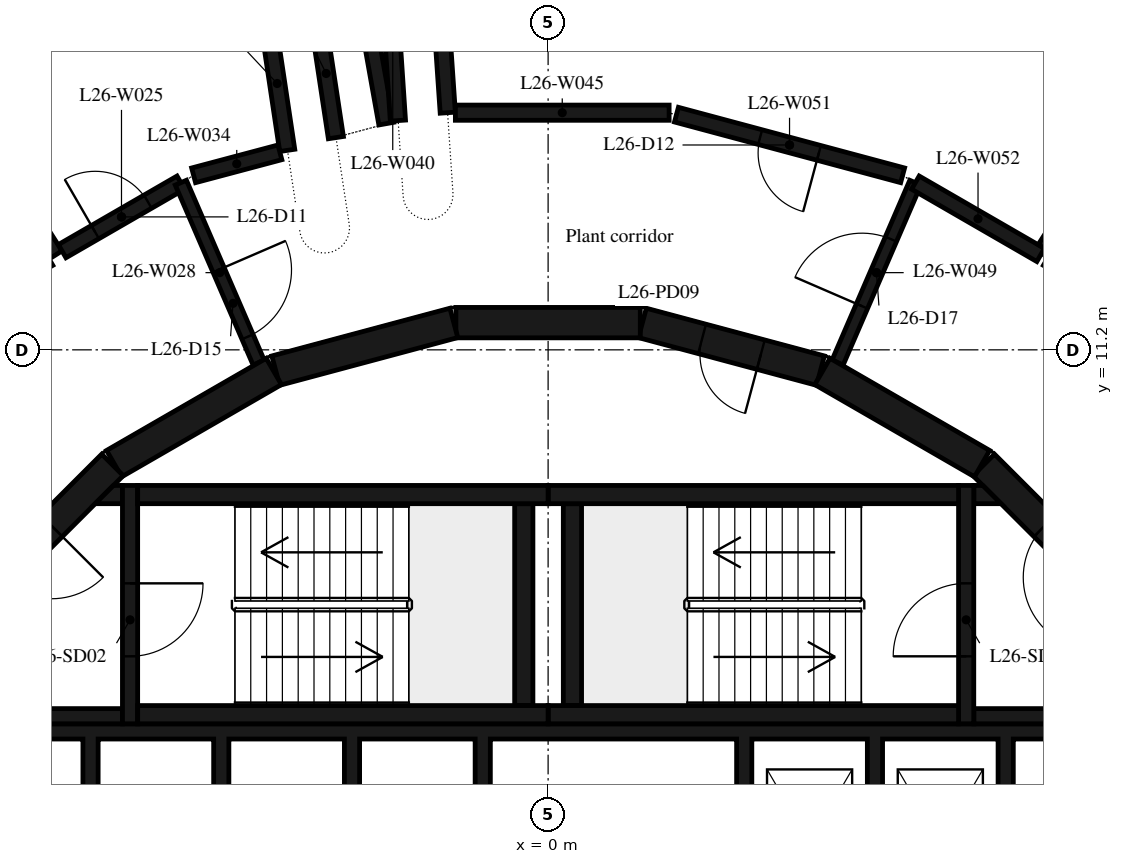
"""IFC4 building model, lengths in metres.
Left out: names, types, materials, properties, quantities, classifications, styles, units other than length and angle.
Written with IfcOpenShell. Run it as: python <this file> out.ifc"""

import sys

from ifc_helpers import new_model, si_unit, direction, frame, frame_2d, origin, place, context, subcontext, project, spatial, polyline, rectangle, outline, extrude, element, fill, save


model = new_model("IFC4")
c1 = context("Model", 3, precision=1e-05, world=origin(), true_north=direction((0.0, 1.0)))
c2 = subcontext(c1, "Body", "Model", "MODEL_VIEW")
j1 = project(units=[si_unit("LENGTHUNIT", "METRE"), si_unit("PLANEANGLEUNIT", "RADIAN")], contexts=[c1])
p1 = place(None, origin())
s1 = spatial("IfcSite", under=j1, at=p1, CompositionType="ELEMENT")
p2 = place(p1, origin())
s2 = spatial("IfcBuilding", under=s1, at=p2, CompositionType="ELEMENT")
p3 = place(p2, frame((0.0, 0.0, 108.2)))
s3 = spatial("IfcBuildingStorey", under=s2, at=p3, CompositionType="ELEMENT", Elevation=108.2)
p4 = place(p3, frame((9.308, 7.164, 0.0), z_axis=(0.0, 0.0, 1.0), x_axis=(-0.707106781187, 0.707106781187, 0.0)))
e1 = element("IfcWall", 1, at=p4, inside=s3, PredefinedType="SHEAR", context=c2, shape_type="SweptSolid", body=[
    extrude(rectangle(XDim=3.032, YDim=0.5, at=frame_2d((1.516, 0.0))), origin(), (0.0, 0.0, 1.0), 4.75),
])
p5 = place(p4, frame((0.416, 0.0, 0.0)))
e2 = element("IfcOpeningElement", 2, at=p5, cuts=e1, PredefinedType="OPENING", context=c2, shape_type="SweptSolid", body=[
    extrude(rectangle(XDim=1.2, YDim=2.1, at=frame_2d((0.6, 1.05))), frame((0.0, 0.26, 0.0), z_axis=(0.0, -1.0, 0.0), x_axis=(1.0, 0.0, 0.0)), (0.0, 0.0, 1.0), 0.52),
])
p6 = place(p3, frame((7.137, 9.329, 0.0), z_axis=(0.0, 0.0, 1.0), x_axis=(-0.865975092491, 0.500087131594, 0.0)))
e3 = element("IfcWall", 3, at=p6, inside=s3, PredefinedType="SHEAR", context=c2, shape_type="SweptSolid", body=[
    extrude(rectangle(XDim=3.033, YDim=0.5, at=frame_2d((1.516, 0.0))), origin(), (0.0, 0.0, 1.0), 4.75),
])
p7 = place(p3, frame((4.479, 10.858, 0.0), z_axis=(0.0, 0.0, 1.0), x_axis=(-0.965948410781, 0.258734743916, 0.0)))
e4 = element("IfcWall", 4, at=p7, inside=s3, PredefinedType="SHEAR", context=c2, shape_type="SweptSolid", body=[
    extrude(rectangle(XDim=3.033, YDim=0.5, at=frame_2d((1.516, 0.0))), origin(), (0.0, 0.0, 1.0), 4.75),
])
p8 = place(p7, frame((1.016, 0.0, 0.0)))
e5 = element("IfcOpeningElement", 5, at=p8, cuts=e4, PredefinedType="OPENING", context=c2, shape_type="SweptSolid", body=[
    extrude(rectangle(XDim=1.0, YDim=2.4, at=frame_2d((0.5, 1.2))), frame((0.0, 0.26, 0.0), z_axis=(0.0, -1.0, 0.0), x_axis=(1.0, 0.0, 0.0)), (0.0, 0.0, 1.0), 0.52),
])
for number, where, z_axis, x_axis in (
    (6, (1.516, 11.647, 0.0), (0.0, 0.0, 1.0), (-1.0, 0.0, 0.0)),
    (7, (-1.55, 11.643, 0.0), (0.0, 0.0, 1.0), (-0.966, -0.259, 0.0)),
    (8, (-4.51, 10.845, 0.0), (0.0, 0.0, 1.0), (-0.866, -0.5, 0.0)),
):
    element("IfcWall", number, at=place(p3, frame(where, z_axis=z_axis, x_axis=x_axis)), inside=s3, PredefinedType="SHEAR", context=c2, shape_type="SweptSolid", body=[
        extrude(rectangle(XDim=3.033, YDim=0.5, at=frame_2d((1.516, 0.0))), origin(), (0.0, 0.0, 1.0), 4.75),
    ])
p9 = place(p3, frame((-7.164, 9.308, 0.0), z_axis=(0.0, 0.0, 1.0), x_axis=(-0.707106781187, -0.707106781187, 0.0)))
e9 = element("IfcWall", 9, at=p9, inside=s3, PredefinedType="SHEAR", context=c2, shape_type="SweptSolid", body=[
    extrude(rectangle(XDim=3.032, YDim=0.5, at=frame_2d((1.516, 0.0))), origin(), (0.0, 0.0, 1.0), 4.75),
])
p10 = place(p9, frame((1.416, 0.0, 0.0)))
e10 = element("IfcOpeningElement", 10, at=p10, cuts=e9, PredefinedType="OPENING", context=c2, shape_type="SweptSolid", body=[
    extrude(rectangle(XDim=1.2, YDim=2.1, at=frame_2d((0.6, 1.05))), frame((0.0, 0.26, 0.0), z_axis=(0.0, -1.0, 0.0), x_axis=(1.0, 0.0, 0.0)), (0.0, 0.0, 1.0), 0.52),
])
for number, where, z_axis, x_axis in (
    (11, (0.0, 5.2, 0.0), (0.0, 0.0, 1.0), (1.0, 0.0, 0.0)),
    (12, (0.0, 8.82, 0.0), (0.0, 0.0, 1.0), (1.0, 0.0, 0.0)),
):
    element("IfcWall", number, at=place(p3, frame(where, z_axis=z_axis, x_axis=x_axis)), inside=s3, PredefinedType="SHEAR", context=c2, shape_type="SweptSolid", body=[
        extrude(rectangle(XDim=6.75, YDim=0.3, at=frame_2d((3.375, 0.0))), origin(), (0.0, 0.0, 1.0), 4.75),
    ])
p11 = place(p3, frame((0.4, 5.35, 0.0), z_axis=(0.0, 0.0, 1.0), x_axis=(0.0, 1.0, 0.0)))
e13 = element("IfcWall", 13, at=p11, inside=s3, PredefinedType="SHEAR", context=c2, shape_type="SweptSolid", body=[
    extrude(rectangle(XDim=3.32, YDim=0.3, at=frame_2d((1.66, 0.0))), origin(), (0.0, 0.0, 1.0), 4.75),
])
p12 = place(p3, frame((6.875, 5.05, 0.0), z_axis=(0.0, 0.0, 1.0), x_axis=(0.0, 1.0, 0.0)))
e14 = element("IfcWall", 14, at=p12, inside=s3, PredefinedType="SHEAR", context=c2, shape_type="SweptSolid", body=[
    extrude(rectangle(XDim=3.92, YDim=0.25, at=frame_2d((1.96, 0.0))), origin(), (0.0, 0.0, 1.0), 4.75),
])
p13 = place(p12, frame((1.11, 0.0, 0.0)))
e15 = element("IfcOpeningElement", 15, at=p13, cuts=e14, PredefinedType="OPENING", context=c2, shape_type="SweptSolid", body=[
    extrude(rectangle(XDim=1.2, YDim=2.1, at=frame_2d((0.6, 1.05))), frame((0.0, 0.135, 0.0), z_axis=(0.0, -1.0, 0.0), x_axis=(1.0, 0.0, 0.0)), (0.0, 0.0, 1.0), 0.27),
])
p14 = place(p3, frame((7.0, 5.175, 0.0), z_axis=(0.0, 0.0, 1.0), x_axis=(1.0, 0.0, 0.0)))
e16 = element("IfcWall", 16, at=p14, inside=s3, PredefinedType="SHEAR", context=c2, shape_type="SweptSolid", body=[
    extrude(rectangle(XDim=3.1, YDim=0.25, at=frame_2d((1.55, 0.0))), origin(), (0.0, 0.0, 1.0), 4.75),
])
p15 = place(p3, origin())
e17 = element("IfcWall", 17, at=p15, inside=s3, PredefinedType="SHEAR", context=c2, shape_type="SweptSolid", body=[
    extrude(outline(polyline([(7.448, 8.67), (7.0, 8.67), (7.0, 8.97), (7.148, 8.97), (7.448, 8.67)])), origin(), (0.0, 0.0, 1.0), 4.75),
])
for number, where, z_axis, x_axis in (
    (18, (-6.75, 5.2, 0.0), (0.0, 0.0, 1.0), (1.0, 0.0, 0.0)),
    (19, (-6.75, 8.82, 0.0), (0.0, 0.0, 1.0), (1.0, 0.0, 0.0)),
):
    element("IfcWall", number, at=place(p3, frame(where, z_axis=z_axis, x_axis=x_axis)), inside=s3, PredefinedType="SHEAR", context=c2, shape_type="SweptSolid", body=[
        extrude(rectangle(XDim=6.75, YDim=0.3, at=frame_2d((3.375, 0.0))), origin(), (0.0, 0.0, 1.0), 4.75),
    ])
p16 = place(p3, frame((-0.4, 5.35, 0.0), z_axis=(0.0, 0.0, 1.0), x_axis=(0.0, 1.0, 0.0)))
e20 = element("IfcWall", 20, at=p16, inside=s3, PredefinedType="SHEAR", context=c2, shape_type="SweptSolid", body=[
    extrude(rectangle(XDim=3.32, YDim=0.3, at=frame_2d((1.66, 0.0))), origin(), (0.0, 0.0, 1.0), 4.75),
])
p17 = place(p3, frame((-6.875, 8.97, 0.0), z_axis=(0.0, 0.0, 1.0), x_axis=(0.0, -1.0, 0.0)))
e21 = element("IfcWall", 21, at=p17, inside=s3, PredefinedType="SHEAR", context=c2, shape_type="SweptSolid", body=[
    extrude(rectangle(XDim=3.92, YDim=0.25, at=frame_2d((1.96, 0.0))), origin(), (0.0, 0.0, 1.0), 4.75),
])
p18 = place(p17, frame((1.61, 0.0, 0.0)))
e22 = element("IfcOpeningElement", 22, at=p18, cuts=e21, PredefinedType="OPENING", context=c2, shape_type="SweptSolid", body=[
    extrude(rectangle(XDim=1.2, YDim=2.1, at=frame_2d((0.6, 1.05))), frame((0.0, 0.135, 0.0), z_axis=(0.0, -1.0, 0.0), x_axis=(1.0, 0.0, 0.0)), (0.0, 0.0, 1.0), 0.27),
])
p19 = place(p3, frame((-7.0, 5.175, 0.0), z_axis=(0.0, 0.0, 1.0), x_axis=(-1.0, 0.0, 0.0)))
e23 = element("IfcWall", 23, at=p19, inside=s3, PredefinedType="SHEAR", context=c2, shape_type="SweptSolid", body=[
    extrude(rectangle(XDim=3.1, YDim=0.25, at=frame_2d((1.55, 0.0))), origin(), (0.0, 0.0, 1.0), 4.75),
])
p20 = place(p3, origin())
e24 = element("IfcWall", 24, at=p20, inside=s3, PredefinedType="SHEAR", context=c2, shape_type="SweptSolid", body=[
    extrude(outline(polyline([(-7.148, 8.97), (-7.0, 8.97), (-7.0, 8.67), (-7.448, 8.67), (-7.148, 8.97)])), origin(), (0.0, 0.0, 1.0), 4.75),
])
p21 = place(p3, origin())
e25 = element("IfcWall", 25, at=p21, inside=s3, PredefinedType="SHEAR", context=c2, shape_type="SweptSolid", body=[
    extrude(outline(polyline([(-9.55, 4.8), (-7.65, 4.8), (-7.65, 1.9), (-7.4, 1.9), (-7.4, 4.8), (-5.5, 4.8), (-5.5, 1.9), (-5.25, 1.9), (-5.25, 4.8), (-3.35, 4.8), (-3.35, 1.9), (-3.1, 1.9), (-3.1, 4.8), (-1.2, 4.8), (-1.2, 1.9), (-0.95, 1.9), (-0.95, 4.8), (3.1, 4.8), (3.1, 1.9), (3.35, 1.9), (3.35, 4.8), (5.25, 4.8), (5.25, 1.9), (5.5, 1.9), (5.5, 4.8), (7.4, 4.8), (7.4, 1.9), (7.65, 1.9), (7.65, 4.8), (9.55, 4.8), (9.55, 1.9), (9.8, 1.9), (9.8, 4.8), (9.8, 5.05), (-9.8, 5.05), (-9.8, 4.8), (-9.8, 1.9), (-9.55, 1.9), (-9.55, 4.8)])), origin(), (0.0, 0.0, 1.0), 4.75),
])
p22 = place(p3, frame((-8.1, 12.76, 0.0), z_axis=(0.0, 0.0, 1.0), x_axis=(-0.535839810612, 0.844319665389, 0.0)))
e26 = element("IfcWall", 26, at=p22, inside=s3, PredefinedType="PARTITIONING", context=c2, shape_type="SweptSolid", body=[
    extrude(rectangle(XDim=8.057, YDim=0.25, at=frame_2d((4.028, 0.0))), origin(), (0.0, 0.0, 1.0), 4.75),
])
p23 = place(p3, frame((-8.208, 12.697, 0.0), z_axis=(0.0, 0.0, 1.0), x_axis=(-0.86455637663, -0.502535841138, 0.0)))
e27 = element("IfcWall", 27, at=p23, inside=s3, PredefinedType="PARTITIONING", context=c2, shape_type="SweptSolid", body=[
    extrude(rectangle(XDim=1.103, YDim=0.25, at=frame_2d((0.552, 0.0))), origin(), (0.0, 0.0, 1.0), 4.75),
])
p24 = place(p3, frame((-7.992, 12.823, 0.0), z_axis=(0.0, 0.0, 1.0), x_axis=(0.865900522319, 0.500216238688, 0.0)))
e28 = element("IfcWall", 28, at=p24, inside=s3, PredefinedType="PARTITIONING", context=c2, shape_type="SweptSolid", body=[
    extrude(rectangle(XDim=2.254, YDim=0.25, at=frame_2d((1.127, 0.0))), origin(), (0.0, 0.0, 1.0), 4.75),
])
p25 = place(p24, frame((0.627, 0.0, 0.0)))
e29 = element("IfcOpeningElement", 29, at=p25, cuts=e28, PredefinedType="OPENING", context=c2, shape_type="SweptSolid", body=[
    extrude(rectangle(XDim=1.0, YDim=2.1, at=frame_2d((0.5, 1.05))), frame((0.0, 0.135, 0.0), z_axis=(0.0, -1.0, 0.0), x_axis=(1.0, 0.0, 0.0)), (0.0, 0.0, 1.0), 0.27),
])
p26 = place(p3, frame((-6.04, 13.949, 0.0), z_axis=(0.0, 0.0, 1.0), x_axis=(0.396905977672, -0.917859272922, 0.0)))
e30 = element("IfcWall", 30, at=p26, inside=s3, PredefinedType="PARTITIONING", context=c2, shape_type="SweptSolid", body=[
    extrude(rectangle(XDim=3.224, YDim=0.2, at=frame_2d((1.612, 0.0))), origin(), (0.0, 0.0, 1.0), 4.75),
])
p27 = place(p26, frame((1.562, 0.0, 0.0)))
e31 = element("IfcOpeningElement", 31, at=p27, cuts=e30, PredefinedType="OPENING", context=c2, shape_type="SweptSolid", body=[
    extrude(rectangle(XDim=1.2, YDim=2.1, at=frame_2d((0.6, 1.05))), frame((0.0, 0.11, 0.0), z_axis=(0.0, -1.0, 0.0), x_axis=(1.0, 0.0, 0.0)), (0.0, 0.0, 1.0), 0.22),
])
p28 = place(p3, frame((-4.62, 16.68, 0.0), z_axis=(0.0, 0.0, 1.0), x_axis=(0.148378019052, -0.98893071722, 0.0)))
e32 = element("IfcWall", 32, at=p28, inside=s3, PredefinedType="PARTITIONING", context=c2, shape_type="SweptSolid", body=[
    extrude(rectangle(XDim=2.225, YDim=0.25, at=frame_2d((1.112, 0.0))), origin(), (0.0, 0.0, 1.0), 4.75),
])
p29 = place(p3, frame((-4.411, 14.448, 0.0), z_axis=(0.0, 0.0, 1.0), x_axis=(-0.966364499744, -0.257176308464, 0.0)))
e33 = element("IfcWall", 33, at=p29, inside=s3, PredefinedType="PARTITIONING", context=c2, shape_type="SweptSolid", body=[
    extrude(rectangle(XDim=1.469, YDim=0.25, at=frame_2d((0.734, 0.0))), origin(), (0.0, 0.0, 1.0), 4.75),
])
p30 = place(p3, frame((-3.49, 14.69, 0.0), z_axis=(0.0, 0.0, 1.0), x_axis=(-0.149968031865, 0.98869084623, 0.0)))
e34 = element("IfcWall", 34, at=p30, inside=s3, PredefinedType="PARTITIONING", context=c2, shape_type="SweptSolid", body=[
    extrude(rectangle(XDim=2.134, YDim=0.25, at=frame_2d((1.067, 0.0))), origin(), (0.0, 0.0, 1.0), 4.75),
])
p31 = place(p3, frame((-2.66, 14.92, 0.0), z_axis=(0.0, 0.0, 1.0), x_axis=(-0.175922099098, 0.984404091341, 0.0)))
e35 = element("IfcWall", 35, at=p31, inside=s3, PredefinedType="PARTITIONING", context=c2, shape_type="SweptSolid", body=[
    extrude(rectangle(XDim=6.106, YDim=0.25, at=frame_2d((3.053, 0.0))), origin(), (0.0, 0.0, 1.0), 4.75),
])
p32 = place(p3, frame((-2.64, 17.52, 0.0), z_axis=(0.0, 0.0, 1.0), x_axis=(0.066487308806, -0.997787270799, 0.0)))
e36 = element("IfcWall", 36, at=p32, inside=s3, PredefinedType="PARTITIONING", context=c2, shape_type="SweptSolid", body=[
    extrude(rectangle(XDim=2.556, YDim=0.25, at=frame_2d((1.278, 0.0))), origin(), (0.0, 0.0, 1.0), 4.75),
])
p33 = place(p3, frame((-1.65, 15.1, 0.0), z_axis=(0.0, 0.0, 1.0), x_axis=(-0.06845491093, 0.997654211222, 0.0)))
e37 = element("IfcWall", 37, at=p33, inside=s3, PredefinedType="PARTITIONING", context=c2, shape_type="SweptSolid", body=[
    extrude(rectangle(XDim=2.486, YDim=0.25, at=frame_2d((1.243, 0.0))), origin(), (0.0, 0.0, 1.0), 4.75),
])
p34 = place(p3, frame((1.99, 15.1, 0.0), z_axis=(0.0, 0.0, 1.0), x_axis=(-1.0, 0.0, 0.0)))
e38 = element("IfcWall", 38, at=p34, inside=s3, PredefinedType="PARTITIONING", context=c2, shape_type="SweptSolid", body=[
    extrude(rectangle(XDim=3.515, YDim=0.25, at=frame_2d((1.757, 0.0))), origin(), (0.0, 0.0, 1.0), 4.75),
])
p35 = place(p3, frame((4.76, 10.99, 0.0), z_axis=(0.0, 0.0, 1.0), x_axis=(0.396905977672, 0.917859272922, 0.0)))
e39 = element("IfcWall", 39, at=p35, inside=s3, PredefinedType="PARTITIONING", context=c2, shape_type="SweptSolid", body=[
    extrude(rectangle(XDim=3.224, YDim=0.2, at=frame_2d((1.612, 0.0))), origin(), (0.0, 0.0, 1.0), 4.75),
])
p36 = place(p35, frame((1.012, 0.0, 0.0)))
e40 = element("IfcOpeningElement", 40, at=p36, cuts=e39, PredefinedType="OPENING", context=c2, shape_type="SweptSolid", body=[
    extrude(rectangle(XDim=1.2, YDim=2.1, at=frame_2d((0.6, 1.05))), frame((0.0, 0.11, 0.0), z_axis=(0.0, -1.0, 0.0), x_axis=(1.0, 0.0, 0.0)), (0.0, 0.0, 1.0), 0.22),
])
p37 = place(p3, frame((5.83, 14.07, 0.0), z_axis=(0.0, 0.0, 1.0), x_axis=(-0.965861411942, 0.259059323171, 0.0)))
e41 = element("IfcWall", 41, at=p37, inside=s3, PredefinedType="PARTITIONING", context=c2, shape_type="SweptSolid", body=[
    extrude(rectangle(XDim=3.851, YDim=0.25, at=frame_2d((1.925, 0.0))), origin(), (0.0, 0.0, 1.0), 4.75),
])
p38 = place(p37, frame((1.425, 0.0, 0.0)))
e42 = element("IfcOpeningElement", 42, at=p38, cuts=e41, PredefinedType="OPENING", context=c2, shape_type="SweptSolid", body=[
    extrude(rectangle(XDim=1.0, YDim=2.1, at=frame_2d((0.5, 1.05))), frame((0.0, 0.135, 0.0), z_axis=(0.0, -1.0, 0.0), x_axis=(1.0, 0.0, 0.0)), (0.0, 0.0, 1.0), 0.27),
])
p39 = place(p3, frame((6.04, 13.95, 0.0), z_axis=(0.0, 0.0, 1.0), x_axis=(0.865922362496, -0.500178430292, 0.0)))
e43 = element("IfcWall", 43, at=p39, inside=s3, PredefinedType="PARTITIONING", context=c2, shape_type="SweptSolid", body=[
    extrude(rectangle(XDim=2.379, YDim=0.25, at=frame_2d((1.189, 0.0))), origin(), (0.0, 0.0, 1.0), 4.75),
])
p40 = place(p3, frame((8.167, 12.865, 0.0), z_axis=(0.0, 0.0, 1.0), x_axis=(0.535313877542, 0.84465321435, 0.0)))
e44 = element("IfcWall", 44, at=p40, inside=s3, PredefinedType="PARTITIONING", context=c2, shape_type="SweptSolid", body=[
    extrude(rectangle(XDim=5.324, YDim=0.25, at=frame_2d((2.662, 0.0))), origin(), (0.0, 0.0, 1.0), 4.75),
])
p41 = place(p3, frame((9.27, 12.08, 0.0), z_axis=(0.0, 0.0, 1.0), x_axis=(-0.864599561852, 0.502461538474, 0.0)))
e45 = element("IfcWall", 45, at=p41, inside=s3, PredefinedType="PARTITIONING", context=c2, shape_type="SweptSolid", body=[
    extrude(rectangle(XDim=1.228, YDim=0.25, at=frame_2d((0.614, 0.0))), origin(), (0.0, 0.0, 1.0), 4.75),
])
p42 = place(p13, origin())
e46 = element("IfcDoor", 46, at=p42, inside=s3, OperationType="SINGLE_SWING_LEFT", PredefinedType="DOOR", context=c2, shape_type="SweptSolid", body=[
    extrude(rectangle(XDim=1.2, YDim=2.1, at=frame_2d((0.6, 1.05))), frame((0.0, 0.025, 0.0), z_axis=(0.0, -1.0, 0.0), x_axis=(1.0, 0.0, 0.0)), (0.0, 0.0, 1.0), 0.05),
])
fill(e15, e46)
p43 = place(p5, origin())
e47 = element("IfcDoor", 47, at=p43, inside=s3, OperationType="SINGLE_SWING_RIGHT", PredefinedType="DOOR", context=c2, shape_type="SweptSolid", body=[
    extrude(rectangle(XDim=1.2, YDim=2.1, at=frame_2d((0.6, 1.05))), frame((0.0, 0.025, 0.0), z_axis=(0.0, -1.0, 0.0), x_axis=(1.0, 0.0, 0.0)), (0.0, 0.0, 1.0), 0.05),
])
fill(e2, e47)
p44 = place(p18, origin())
e48 = element("IfcDoor", 48, at=p44, inside=s3, OperationType="SINGLE_SWING_LEFT", PredefinedType="DOOR", context=c2, shape_type="SweptSolid", body=[
    extrude(rectangle(XDim=1.2, YDim=2.1, at=frame_2d((0.6, 1.05))), frame((0.0, 0.025, 0.0), z_axis=(0.0, -1.0, 0.0), x_axis=(1.0, 0.0, 0.0)), (0.0, 0.0, 1.0), 0.05),
])
fill(e22, e48)
p45 = place(p10, origin())
e49 = element("IfcDoor", 49, at=p45, inside=s3, OperationType="SINGLE_SWING_RIGHT", PredefinedType="DOOR", context=c2, shape_type="SweptSolid", body=[
    extrude(rectangle(XDim=1.2, YDim=2.1, at=frame_2d((0.6, 1.05))), frame((0.0, 0.025, 0.0), z_axis=(0.0, -1.0, 0.0), x_axis=(1.0, 0.0, 0.0)), (0.0, 0.0, 1.0), 0.05),
])
fill(e10, e49)
p46 = place(p8, origin())
e50 = element("IfcDoor", 50, at=p46, inside=s3, OperationType="SINGLE_SWING_RIGHT", PredefinedType="DOOR", context=c2, shape_type="SweptSolid", body=[
    extrude(rectangle(XDim=1.0, YDim=2.4, at=frame_2d((0.5, 1.2))), frame((0.0, 0.025, 0.0), z_axis=(0.0, -1.0, 0.0), x_axis=(1.0, 0.0, 0.0)), (0.0, 0.0, 1.0), 0.05),
])
fill(e5, e50)
p47 = place(p25, origin())
e51 = element("IfcDoor", 51, at=p47, inside=s3, OperationType="SINGLE_SWING_LEFT", PredefinedType="DOOR", context=c2, shape_type="SweptSolid", body=[
    extrude(rectangle(XDim=1.0, YDim=2.1, at=frame_2d((0.5, 1.05))), frame((0.0, 0.025, 0.0), z_axis=(0.0, -1.0, 0.0), x_axis=(1.0, 0.0, 0.0)), (0.0, 0.0, 1.0), 0.05),
])
fill(e29, e51)
p48 = place(p38, origin())
e52 = element("IfcDoor", 52, at=p48, inside=s3, OperationType="SINGLE_SWING_LEFT", PredefinedType="DOOR", context=c2, shape_type="SweptSolid", body=[
    extrude(rectangle(XDim=1.0, YDim=2.1, at=frame_2d((0.5, 1.05))), frame((0.0, 0.025, 0.0), z_axis=(0.0, -1.0, 0.0), x_axis=(1.0, 0.0, 0.0)), (0.0, 0.0, 1.0), 0.05),
])
fill(e42, e52)
p49 = place(p27, origin())
e53 = element("IfcDoor", 53, at=p49, inside=s3, OperationType="SINGLE_SWING_LEFT", PredefinedType="DOOR", context=c2, shape_type="SweptSolid", body=[
    extrude(rectangle(XDim=1.2, YDim=2.1, at=frame_2d((0.6, 1.05))), frame((0.0, 0.025, 0.0), z_axis=(0.0, -1.0, 0.0), x_axis=(1.0, 0.0, 0.0)), (0.0, 0.0, 1.0), 0.05),
])
fill(e31, e53)
p50 = place(p36, origin())
e54 = element("IfcDoor", 54, at=p50, inside=s3, OperationType="SINGLE_SWING_LEFT", PredefinedType="DOOR", context=c2, shape_type="SweptSolid", body=[
    extrude(rectangle(XDim=1.2, YDim=2.1, at=frame_2d((0.6, 1.05))), frame((0.0, 0.025, 0.0), z_axis=(0.0, -1.0, 0.0), x_axis=(1.0, 0.0, 0.0)), (0.0, 0.0, 1.0), 0.05),
])
fill(e40, e54)
save(model, sys.argv[1])
